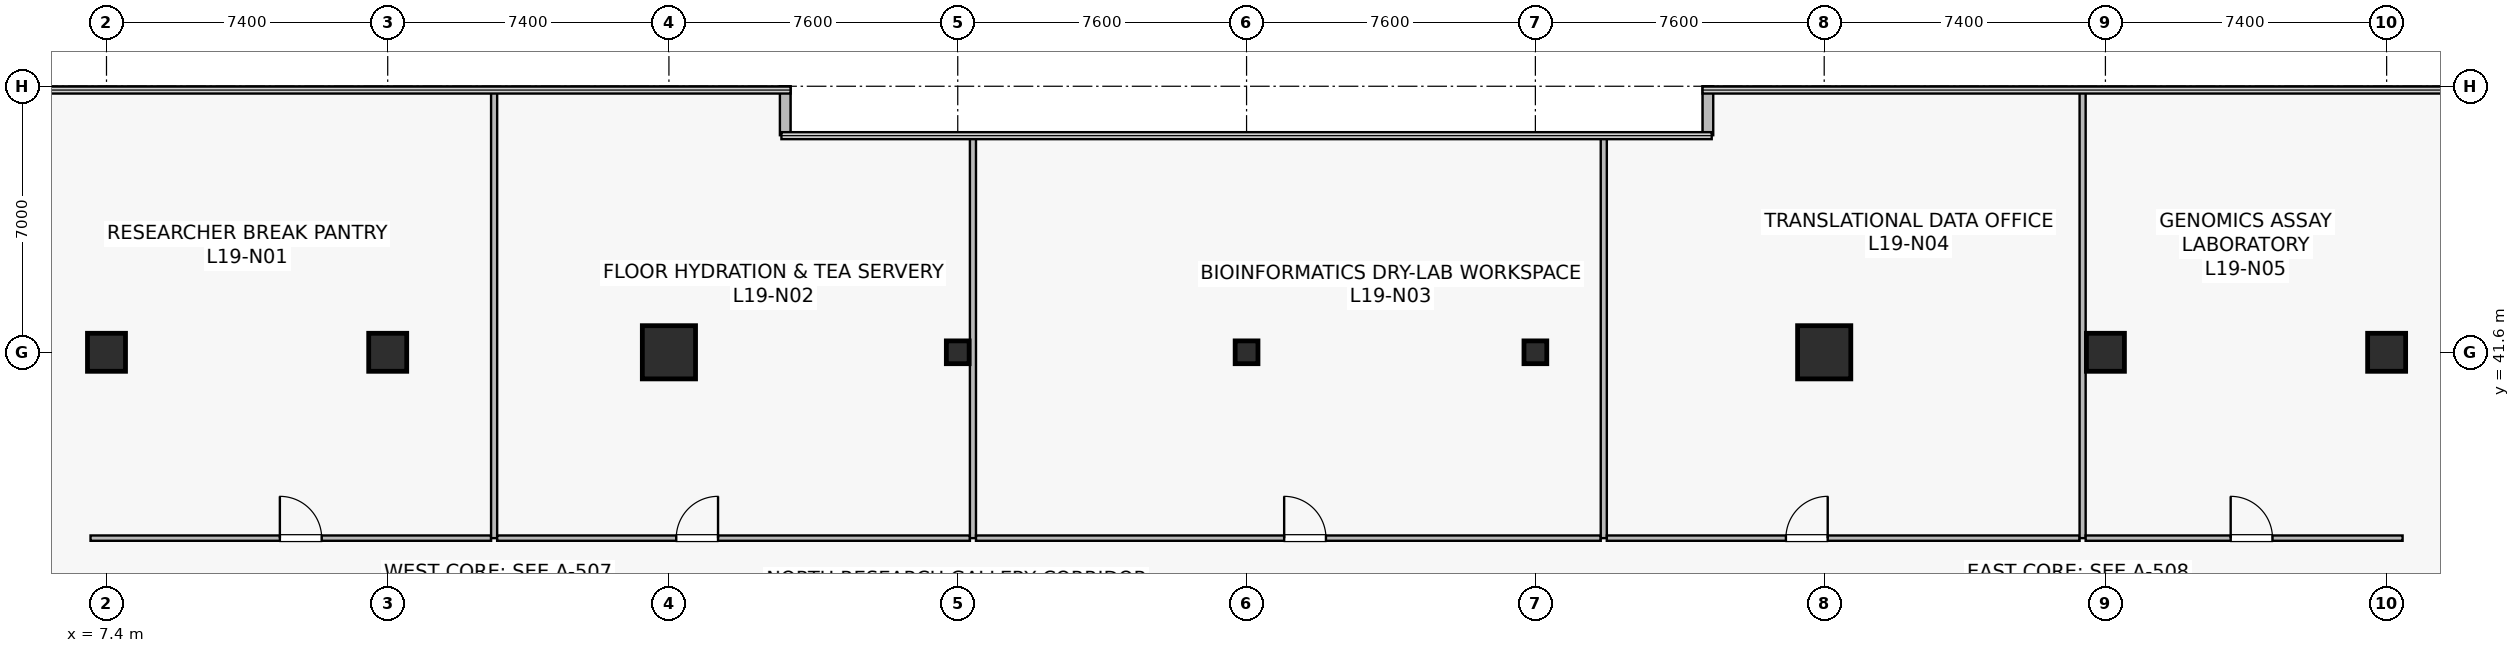
"""IFC4 building model, lengths in metres.
Left out: names, types, materials, properties, quantities, classifications, styles, units other than length and angle.
Written with IfcOpenShell. Run it as: python <this file> out.ifc"""

import sys

from ifc_helpers import new_model, si_unit, direction, frame, frame_2d, origin, origin_2d, place, context, subcontext, project, spatial, rectangle, hollow_rectangle, extrude, source, transform, mapped, element, fill, save


model = new_model("IFC4")
c1 = context("Model", 3, precision=1e-05, world=origin(), true_north=direction((0.0, 1.0)))
c2 = subcontext(c1, "Body", "Model", "MODEL_VIEW")
j1 = project(units=[si_unit("LENGTHUNIT", "METRE"), si_unit("PLANEANGLEUNIT", "RADIAN")], contexts=[c1])
p1 = place(None, origin())
s1 = spatial("IfcSite", under=j1, at=p1, CompositionType="ELEMENT")
p2 = place(p1, origin())
s2 = spatial("IfcBuilding", under=s1, at=p2, CompositionType="ELEMENT")
p3 = place(p2, frame((0.0, 0.0, 78.5)))
s3 = spatial("IfcBuildingStorey", under=s2, at=p3, CompositionType="ELEMENT", Elevation=78.5)
m1 = source(origin(), c2, "Body", "SweptSolid", [
    extrude(rectangle(XDim=1.0, YDim=1.0, at=origin_2d()), origin(), (0.0, 0.0, 1.0), 4.1),
])
p4 = place(p3, frame((14.8, 41.6, 0.0), z_axis=(0.0, 0.0, 1.0), x_axis=(1.0, 0.0, 0.0)))
e1 = element("IfcColumn", 1, at=p4, inside=s3, PredefinedType="COLUMN", context=c2, shape_type="MappedRepresentation", body=[
    mapped(m1, transform((0.0, 0.0, 0.0), scale=1.0)),
])
m2 = source(origin(), c2, "Body", "SweptSolid", [
    extrude(rectangle(XDim=1.4, YDim=1.4, at=origin_2d()), origin(), (0.0, 0.0, 1.0), 4.1),
])
for number, where, z_axis, x_axis in (
    (2, (22.2, 41.6, 0.0), (0.0, 0.0, 1.0), (1.0, 0.0, 0.0)),
    (3, (52.6, 41.6, 0.0), (0.0, 0.0, 1.0), (1.0, 0.0, 0.0)),
):
    element("IfcColumn", number, at=place(p3, frame(where, z_axis=z_axis, x_axis=x_axis)), inside=s3, PredefinedType="COLUMN", context=c2, shape_type="MappedRepresentation", body=[
        mapped(m2, transform((0.0, 0.0, 0.0), scale=1.0)),
    ])
for number, where, z_axis, x_axis in (
    (4, (60.0, 41.6, 0.0), (0.0, 0.0, 1.0), (1.0, 0.0, 0.0)),
    (5, (7.4, 41.6, 0.0), (0.0, 0.0, 1.0), (1.0, 0.0, 0.0)),
    (6, (67.4, 41.6, 0.0), (0.0, 0.0, 1.0), (1.0, 0.0, 0.0)),
):
    element("IfcColumn", number, at=place(p3, frame(where, z_axis=z_axis, x_axis=x_axis)), inside=s3, PredefinedType="COLUMN", context=c2, shape_type="MappedRepresentation", body=[
        mapped(m1, transform((0.0, 0.0, 0.0), scale=1.0)),
    ])
m3 = source(origin(), c2, "Body", "SweptSolid", [
    extrude(hollow_rectangle(XDim=0.6, YDim=0.6, WallThickness=0.028, at=origin_2d()), origin(), (0.0, 0.0, 1.0), 4.1),
])
for number, where, z_axis, x_axis in (
    (7, (29.8, 41.6, 0.0), (0.0, 0.0, 1.0), (1.0, 0.0, 0.0)),
    (8, (37.4, 41.6, 0.0), (0.0, 0.0, 1.0), (1.0, 0.0, 0.0)),
    (9, (45.0, 41.6, 0.0), (0.0, 0.0, 1.0), (1.0, 0.0, 0.0)),
):
    element("IfcColumn", number, at=place(p3, frame(where, z_axis=z_axis, x_axis=x_axis)), inside=s3, PredefinedType="COLUMN", context=c2, shape_type="MappedRepresentation", body=[
        mapped(m3, transform((0.0, 0.0, 0.0), scale=1.0)),
    ])
for number, where, z_axis, x_axis in (
    (10, (49.54, 48.6, 0.0), (0.0, 0.0, 1.0), (0.0, -1.0, 0.0)),
    (11, (25.26, 47.312, 0.0), (0.0, 0.0, 1.0), (0.0, 1.0, 0.0)),
):
    element("IfcWall", number, at=place(p3, frame(where, z_axis=z_axis, x_axis=x_axis)), inside=s3, PredefinedType="STANDARD", context=c2, shape_type="SweptSolid", body=[
        extrude(rectangle(XDim=1.288, YDim=0.28, at=frame_2d((0.644, 0.0))), origin(), (0.0, 0.0, 1.0), 3.78),
    ])
p5 = place(p3, frame((6.98, 36.71, 0.0), z_axis=(0.0, 0.0, 1.0), x_axis=(1.0, 0.0, 0.0)))
e12 = element("IfcWall", 12, at=p5, inside=s3, PredefinedType="PARTITIONING", context=c2, shape_type="SweptSolid", body=[
    extrude(rectangle(XDim=10.54, YDim=0.14, at=frame_2d((5.27, 0.0))), origin(), (0.0, 0.0, 1.0), 3.115),
])
p6 = place(p5, frame((4.982, 0.0, 0.0)))
e13 = element("IfcOpeningElement", 13, at=p6, cuts=e12, PredefinedType="OPENING", context=c2, shape_type="SweptSolid", body=[
    extrude(rectangle(XDim=1.1, YDim=2.18, at=frame_2d((0.55, 1.09))), frame((0.0, 0.08, 0.0), z_axis=(0.0, -1.0, 0.0), x_axis=(1.0, 0.0, 0.0)), (0.0, 0.0, 1.0), 0.16),
])
p7 = place(p3, frame((17.6, 36.71, 0.0), z_axis=(0.0, 0.0, 1.0), x_axis=(0.0, 1.0, 0.0)))
e14 = element("IfcWall", 14, at=p7, inside=s3, PredefinedType="PARTITIONING", context=c2, shape_type="SweptSolid", body=[
    extrude(rectangle(XDim=11.78, YDim=0.16, at=frame_2d((5.89, 0.0))), origin(), (0.0, 0.0, 1.0), 3.015),
])
p8 = place(p3, frame((17.68, 36.71, 0.0), z_axis=(0.0, 0.0, 1.0), x_axis=(1.0, 0.0, 0.0)))
e15 = element("IfcWall", 15, at=p8, inside=s3, PredefinedType="PARTITIONING", context=c2, shape_type="SweptSolid", body=[
    extrude(rectangle(XDim=12.44, YDim=0.14, at=frame_2d((6.22, 0.0))), origin(), (0.0, 0.0, 1.0), 3.115),
])
p9 = place(p8, frame((4.712, 0.0, 0.0)))
e16 = element("IfcOpeningElement", 16, at=p9, cuts=e15, PredefinedType="OPENING", context=c2, shape_type="SweptSolid", body=[
    extrude(rectangle(XDim=1.1, YDim=2.18, at=frame_2d((0.55, 1.09))), frame((0.0, 0.08, 0.0), z_axis=(0.0, -1.0, 0.0), x_axis=(1.0, 0.0, 0.0)), (0.0, 0.0, 1.0), 0.16),
])
p10 = place(p3, frame((30.2, 36.71, 0.0), z_axis=(0.0, 0.0, 1.0), x_axis=(0.0, 1.0, 0.0)))
e17 = element("IfcWall", 17, at=p10, inside=s3, PredefinedType="PARTITIONING", context=c2, shape_type="SweptSolid", body=[
    extrude(rectangle(XDim=10.58, YDim=0.16, at=frame_2d((5.29, 0.0))), origin(), (0.0, 0.0, 1.0), 3.015),
])
p11 = place(p3, frame((30.28, 36.71, 0.0), z_axis=(0.0, 0.0, 1.0), x_axis=(1.0, 0.0, 0.0)))
e18 = element("IfcWall", 18, at=p11, inside=s3, PredefinedType="PARTITIONING", context=c2, shape_type="SweptSolid", body=[
    extrude(rectangle(XDim=16.44, YDim=0.14, at=frame_2d((8.22, 0.0))), origin(), (0.0, 0.0, 1.0), 3.115),
])
p12 = place(p11, frame((8.109, 0.0, 0.0)))
e19 = element("IfcOpeningElement", 19, at=p12, cuts=e18, PredefinedType="OPENING", context=c2, shape_type="SweptSolid", body=[
    extrude(rectangle(XDim=1.1, YDim=2.18, at=frame_2d((0.55, 1.09))), frame((0.0, 0.08, 0.0), z_axis=(0.0, -1.0, 0.0), x_axis=(1.0, 0.0, 0.0)), (0.0, 0.0, 1.0), 0.16),
])
p13 = place(p3, frame((46.8, 36.71, 0.0), z_axis=(0.0, 0.0, 1.0), x_axis=(0.0, 1.0, 0.0)))
e20 = element("IfcWall", 20, at=p13, inside=s3, PredefinedType="PARTITIONING", context=c2, shape_type="SweptSolid", body=[
    extrude(rectangle(XDim=10.58, YDim=0.16, at=frame_2d((5.29, 0.0))), origin(), (0.0, 0.0, 1.0), 3.015),
])
p14 = place(p3, frame((46.88, 36.71, 0.0), z_axis=(0.0, 0.0, 1.0), x_axis=(1.0, 0.0, 0.0)))
e21 = element("IfcWall", 21, at=p14, inside=s3, PredefinedType="PARTITIONING", context=c2, shape_type="SweptSolid", body=[
    extrude(rectangle(XDim=12.44, YDim=0.14, at=frame_2d((6.22, 0.0))), origin(), (0.0, 0.0, 1.0), 3.115),
])
p15 = place(p14, frame((4.712, 0.0, 0.0)))
e22 = element("IfcOpeningElement", 22, at=p15, cuts=e21, PredefinedType="OPENING", context=c2, shape_type="SweptSolid", body=[
    extrude(rectangle(XDim=1.1, YDim=2.18, at=frame_2d((0.55, 1.09))), frame((0.0, 0.08, 0.0), z_axis=(0.0, -1.0, 0.0), x_axis=(1.0, 0.0, 0.0)), (0.0, 0.0, 1.0), 0.16),
])
p16 = place(p3, frame((59.4, 36.71, 0.0), z_axis=(0.0, 0.0, 1.0), x_axis=(0.0, 1.0, 0.0)))
e23 = element("IfcWall", 23, at=p16, inside=s3, PredefinedType="PARTITIONING", context=c2, shape_type="SweptSolid", body=[
    extrude(rectangle(XDim=11.78, YDim=0.16, at=frame_2d((5.89, 0.0))), origin(), (0.0, 0.0, 1.0), 3.015),
])
p17 = place(p3, frame((59.48, 36.71, 0.0), z_axis=(0.0, 0.0, 1.0), x_axis=(1.0, 0.0, 0.0)))
e24 = element("IfcWall", 24, at=p17, inside=s3, PredefinedType="PARTITIONING", context=c2, shape_type="SweptSolid", body=[
    extrude(rectangle(XDim=8.34, YDim=0.14, at=frame_2d((4.17, 0.0))), origin(), (0.0, 0.0, 1.0), 3.115),
])
p18 = place(p17, frame((3.816, 0.0, 0.0)))
e25 = element("IfcOpeningElement", 25, at=p18, cuts=e24, PredefinedType="OPENING", context=c2, shape_type="SweptSolid", body=[
    extrude(rectangle(XDim=1.1, YDim=2.18, at=frame_2d((0.55, 1.09))), frame((0.0, 0.08, 0.0), z_axis=(0.0, -1.0, 0.0), x_axis=(1.0, 0.0, 0.0)), (0.0, 0.0, 1.0), 0.16),
])
m4 = source(origin(), c2, "Body", "SweptSolid", [
    extrude(rectangle(XDim=1.1, YDim=2.18, at=frame_2d((0.55, 1.09))), frame((0.0, 0.025, 0.0), z_axis=(0.0, -1.0, 0.0), x_axis=(1.0, 0.0, 0.0)), (0.0, 0.0, 1.0), 0.05),
])
p19 = place(p6, origin())
e26 = element("IfcDoor", 26, at=p19, inside=s3, OperationType="SINGLE_SWING_LEFT", PredefinedType="DOOR", context=c2, shape_type="MappedRepresentation", body=[
    mapped(m4, transform((0.0, 0.0, 0.0), scale=1.0)),
])
fill(e13, e26)
p20 = place(p9, origin())
e27 = element("IfcDoor", 27, at=p20, inside=s3, OperationType="SINGLE_SWING_RIGHT", PredefinedType="DOOR", context=c2, shape_type="MappedRepresentation", body=[
    mapped(m4, transform((0.0, 0.0, 0.0), scale=1.0)),
])
fill(e16, e27)
p21 = place(p12, origin())
e28 = element("IfcDoor", 28, at=p21, inside=s3, OperationType="SINGLE_SWING_LEFT", PredefinedType="DOOR", context=c2, shape_type="MappedRepresentation", body=[
    mapped(m4, transform((0.0, 0.0, 0.0), scale=1.0)),
])
fill(e19, e28)
p22 = place(p15, origin())
e29 = element("IfcDoor", 29, at=p22, inside=s3, OperationType="SINGLE_SWING_RIGHT", PredefinedType="DOOR", context=c2, shape_type="MappedRepresentation", body=[
    mapped(m4, transform((0.0, 0.0, 0.0), scale=1.0)),
])
fill(e22, e29)
p23 = place(p18, origin())
e30 = element("IfcDoor", 30, at=p23, inside=s3, OperationType="SINGLE_SWING_LEFT", PredefinedType="DOOR", context=c2, shape_type="MappedRepresentation", body=[
    mapped(m4, transform((0.0, 0.0, 0.0), scale=1.0)),
])
fill(e25, e30)
save(model, sys.argv[1])
